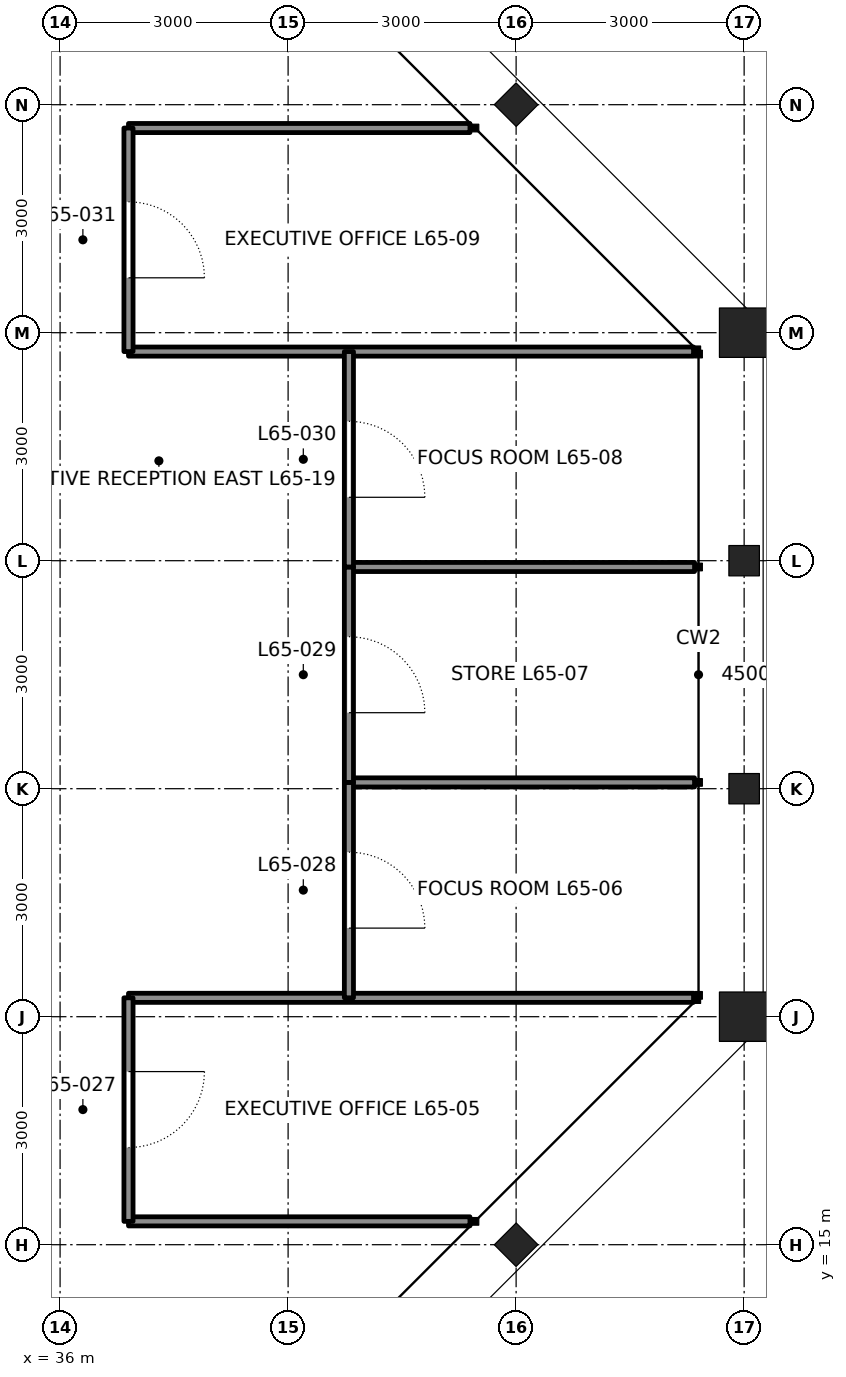
"""IFC4 building model, lengths in metres.
Left out: names, types, materials, properties, quantities, classifications, styles, units other than length and angle.
Written with IfcOpenShell. Run it as: python <this file> out.ifc"""

import sys

from ifc_helpers import new_model, si_unit, direction, frame, frame_2d, origin, origin_2d, place, context, subcontext, project, spatial, rectangle, hollow_rectangle, i_section, extrude, element, fill, save


model = new_model("IFC4")
c1 = context("Model", 3, precision=1e-05, world=origin(), true_north=direction((0.0, 1.0)))
c2 = subcontext(c1, "Body", "Model", "MODEL_VIEW")
j1 = project(units=[si_unit("LENGTHUNIT", "METRE"), si_unit("PLANEANGLEUNIT", "RADIAN")], contexts=[c1])
p1 = place(None, origin())
s1 = spatial("IfcSite", under=j1, at=p1, CompositionType="ELEMENT")
p2 = place(p1, origin())
s2 = spatial("IfcBuilding", under=s1, at=p2, CompositionType="ELEMENT")
p3 = place(p2, frame((0.0, 0.0, 291.6)))
s3 = spatial("IfcBuildingStorey", under=s2, at=p3, CompositionType="ELEMENT", Elevation=291.6)
p4 = place(p3, frame((42.0, 15.0, 0.0), z_axis=(0.0, 0.0, 1.0), x_axis=(0.707106781187, -0.707106781187, 0.0)))
e1 = element("IfcColumn", 1, at=p4, inside=s3, PredefinedType="COLUMN", context=c2, shape_type="SweptSolid", body=[
    extrude(i_section(OverallWidth=0.404, OverallDepth=0.406, WebThickness=0.027, FlangeThickness=0.044, at=origin_2d()), origin(), (0.0, 0.0, 1.0), 4.2),
])
p5 = place(p3, frame((45.0, 18.0, 0.0), z_axis=(0.0, 0.0, 1.0), x_axis=(1.0, 0.0, 0.0)))
e2 = element("IfcColumn", 2, at=p5, inside=s3, PredefinedType="COLUMN", context=c2, shape_type="SweptSolid", body=[
    extrude(hollow_rectangle(XDim=0.65, YDim=0.65, WallThickness=0.065, at=origin_2d()), origin(), (0.0, 0.0, 1.0), 4.2),
])
for number, where, z_axis, x_axis in (
    (3, (45.0, 21.0, 0.0), (0.0, 0.0, 1.0), (1.0, 0.0, 0.0)),
    (4, (45.0, 24.0, 0.0), (0.0, 0.0, 1.0), (1.0, 0.0, 0.0)),
):
    element("IfcColumn", number, at=place(p3, frame(where, z_axis=z_axis, x_axis=x_axis)), inside=s3, PredefinedType="COLUMN", context=c2, shape_type="SweptSolid", body=[
        extrude(i_section(OverallWidth=0.401, OverallDepth=0.399, WebThickness=0.025, FlangeThickness=0.04, at=origin_2d()), origin(), (0.0, 0.0, 1.0), 4.2),
    ])
p6 = place(p3, frame((45.0, 27.0, 0.0), z_axis=(0.0, 0.0, 1.0), x_axis=(1.0, 0.0, 0.0)))
e5 = element("IfcColumn", 5, at=p6, inside=s3, PredefinedType="COLUMN", context=c2, shape_type="SweptSolid", body=[
    extrude(hollow_rectangle(XDim=0.65, YDim=0.65, WallThickness=0.065, at=origin_2d()), origin(), (0.0, 0.0, 1.0), 4.2),
])
p7 = place(p3, frame((42.0, 30.0, 0.0), z_axis=(0.0, 0.0, 1.0), x_axis=(0.707106781187, 0.707106781187, 0.0)))
e6 = element("IfcColumn", 6, at=p7, inside=s3, PredefinedType="COLUMN", context=c2, shape_type="SweptSolid", body=[
    extrude(i_section(OverallWidth=0.404, OverallDepth=0.406, WebThickness=0.027, FlangeThickness=0.044, at=origin_2d()), origin(), (0.0, 0.0, 1.0), 4.2),
])
p8 = place(p3, frame((41.393, 15.307, 0.0), z_axis=(0.0, 0.0, 1.0), x_axis=(-1.0, 0.0, 0.0)))
e7 = element("IfcWall", 7, at=p8, inside=s3, PredefinedType="PARTITIONING", context=c2, shape_type="SweptSolid", body=[
    extrude(rectangle(XDim=4.493, YDim=0.12, at=frame_2d((2.246, 0.0))), origin(), (0.0, 0.0, 1.0), 4.04),
])
p9 = place(p3, frame((44.334, 18.249, 0.0), z_axis=(0.0, 0.0, 1.0), x_axis=(-1.0, 0.0, 0.0)))
e8 = element("IfcWall", 8, at=p9, inside=s3, PredefinedType="PARTITIONING", context=c2, shape_type="SweptSolid", body=[
    extrude(rectangle(XDim=7.434, YDim=0.12, at=frame_2d((3.717, 0.0))), origin(), (0.0, 0.0, 1.0), 4.04),
])
for number, where, z_axis, x_axis in (
    (9, (44.347, 21.083, 0.0), (0.0, 0.0, 1.0), (-1.0, 0.0, 0.0)),
    (10, (44.347, 23.917, 0.0), (0.0, 0.0, 1.0), (-1.0, 0.0, 0.0)),
):
    element("IfcWall", number, at=place(p3, frame(where, z_axis=z_axis, x_axis=x_axis)), inside=s3, PredefinedType="PARTITIONING", context=c2, shape_type="SweptSolid", body=[
        extrude(rectangle(XDim=4.547, YDim=0.12, at=frame_2d((2.274, 0.0))), origin(), (0.0, 0.0, 1.0), 3.357),
    ])
p10 = place(p3, frame((44.334, 26.751, 0.0), z_axis=(0.0, 0.0, 1.0), x_axis=(-1.0, 0.0, 0.0)))
e11 = element("IfcWall", 11, at=p10, inside=s3, PredefinedType="PARTITIONING", context=c2, shape_type="SweptSolid", body=[
    extrude(rectangle(XDim=7.434, YDim=0.12, at=frame_2d((3.717, 0.0))), origin(), (0.0, 0.0, 1.0), 4.04),
])
p11 = place(p3, frame((41.393, 29.693, 0.0), z_axis=(0.0, 0.0, 1.0), x_axis=(-1.0, 0.0, 0.0)))
e12 = element("IfcWall", 12, at=p11, inside=s3, PredefinedType="PARTITIONING", context=c2, shape_type="SweptSolid", body=[
    extrude(rectangle(XDim=4.493, YDim=0.12, at=frame_2d((2.246, 0.0))), origin(), (0.0, 0.0, 1.0), 4.04),
])
p12 = place(p3, frame((36.9, 15.307, 0.0), z_axis=(0.0, 0.0, 1.0), x_axis=(0.0, 1.0, 0.0)))
e13 = element("IfcWall", 13, at=p12, inside=s3, PredefinedType="PARTITIONING", context=c2, shape_type="SweptSolid", body=[
    extrude(rectangle(XDim=2.941, YDim=0.12, at=frame_2d((1.471, 0.0))), origin(), (0.0, 0.0, 1.0), 4.04),
])
p13 = place(p12, frame((0.971, 0.0, 0.0)))
e14 = element("IfcOpeningElement", 14, at=p13, cuts=e13, PredefinedType="OPENING", context=c2, shape_type="SweptSolid", body=[
    extrude(rectangle(XDim=1.0, YDim=2.4, at=frame_2d((0.5, 1.2))), frame((0.0, 0.07, 0.0), z_axis=(0.0, -1.0, 0.0), x_axis=(1.0, 0.0, 0.0)), (0.0, 0.0, 1.0), 0.14),
])
p14 = place(p3, frame((39.8, 18.249, 0.0), z_axis=(0.0, 0.0, 1.0), x_axis=(0.0, 1.0, 0.0)))
e15 = element("IfcWall", 15, at=p14, inside=s3, PredefinedType="PARTITIONING", context=c2, shape_type="SweptSolid", body=[
    extrude(rectangle(XDim=2.834, YDim=0.12, at=frame_2d((1.417, 0.0))), origin(), (0.0, 0.0, 1.0), 4.04),
])
p15 = place(p14, frame((0.917, 0.0, 0.0)))
e16 = element("IfcOpeningElement", 16, at=p15, cuts=e15, PredefinedType="OPENING", context=c2, shape_type="SweptSolid", body=[
    extrude(rectangle(XDim=1.0, YDim=2.4, at=frame_2d((0.5, 1.2))), frame((0.0, 0.07, 0.0), z_axis=(0.0, -1.0, 0.0), x_axis=(1.0, 0.0, 0.0)), (0.0, 0.0, 1.0), 0.14),
])
p16 = place(p3, frame((39.8, 21.083, 0.0), z_axis=(0.0, 0.0, 1.0), x_axis=(0.0, 1.0, 0.0)))
e17 = element("IfcWall", 17, at=p16, inside=s3, PredefinedType="PARTITIONING", context=c2, shape_type="SweptSolid", body=[
    extrude(rectangle(XDim=2.834, YDim=0.12, at=frame_2d((1.417, 0.0))), origin(), (0.0, 0.0, 1.0), 4.04),
])
p17 = place(p16, frame((0.917, 0.0, 0.0)))
e18 = element("IfcOpeningElement", 18, at=p17, cuts=e17, PredefinedType="OPENING", context=c2, shape_type="SweptSolid", body=[
    extrude(rectangle(XDim=1.0, YDim=2.4, at=frame_2d((0.5, 1.2))), frame((0.0, 0.07, 0.0), z_axis=(0.0, -1.0, 0.0), x_axis=(1.0, 0.0, 0.0)), (0.0, 0.0, 1.0), 0.14),
])
p18 = place(p3, frame((39.8, 23.917, 0.0), z_axis=(0.0, 0.0, 1.0), x_axis=(0.0, 1.0, 0.0)))
e19 = element("IfcWall", 19, at=p18, inside=s3, PredefinedType="PARTITIONING", context=c2, shape_type="SweptSolid", body=[
    extrude(rectangle(XDim=2.834, YDim=0.12, at=frame_2d((1.417, 0.0))), origin(), (0.0, 0.0, 1.0), 4.04),
])
p19 = place(p18, frame((0.917, 0.0, 0.0)))
e20 = element("IfcOpeningElement", 20, at=p19, cuts=e19, PredefinedType="OPENING", context=c2, shape_type="SweptSolid", body=[
    extrude(rectangle(XDim=1.0, YDim=2.4, at=frame_2d((0.5, 1.2))), frame((0.0, 0.07, 0.0), z_axis=(0.0, -1.0, 0.0), x_axis=(1.0, 0.0, 0.0)), (0.0, 0.0, 1.0), 0.14),
])
p20 = place(p3, frame((36.9, 26.751, 0.0), z_axis=(0.0, 0.0, 1.0), x_axis=(0.0, 1.0, 0.0)))
e21 = element("IfcWall", 21, at=p20, inside=s3, PredefinedType="PARTITIONING", context=c2, shape_type="SweptSolid", body=[
    extrude(rectangle(XDim=2.941, YDim=0.12, at=frame_2d((1.471, 0.0))), origin(), (0.0, 0.0, 1.0), 4.04),
])
p21 = place(p20, frame((0.971, 0.0, 0.0)))
e22 = element("IfcOpeningElement", 22, at=p21, cuts=e21, PredefinedType="OPENING", context=c2, shape_type="SweptSolid", body=[
    extrude(rectangle(XDim=1.0, YDim=2.4, at=frame_2d((0.5, 1.2))), frame((0.0, 0.07, 0.0), z_axis=(0.0, -1.0, 0.0), x_axis=(1.0, 0.0, 0.0)), (0.0, 0.0, 1.0), 0.14),
])
p22 = place(p13, frame((1.0, 0.0, 0.0), z_axis=(0.0, 0.0, 1.0), x_axis=(-1.0, 0.0, 0.0)))
e23 = element("IfcDoor", 23, at=p22, inside=s3, OperationType="SINGLE_SWING_LEFT", PredefinedType="DOOR", context=c2, shape_type="SweptSolid", body=[
    extrude(rectangle(XDim=1.0, YDim=2.4, at=frame_2d((0.5, 1.2))), frame((0.0, 0.025, 0.0), z_axis=(0.0, -1.0, 0.0), x_axis=(1.0, 0.0, 0.0)), (0.0, 0.0, 1.0), 0.05),
])
fill(e14, e23)
p23 = place(p15, frame((1.0, 0.0, 0.0), z_axis=(0.0, 0.0, 1.0), x_axis=(-1.0, 0.0, 0.0)))
e24 = element("IfcDoor", 24, at=p23, inside=s3, OperationType="SINGLE_SWING_RIGHT", PredefinedType="DOOR", context=c2, shape_type="SweptSolid", body=[
    extrude(rectangle(XDim=1.0, YDim=2.4, at=frame_2d((0.5, 1.2))), frame((0.0, 0.025, 0.0), z_axis=(0.0, -1.0, 0.0), x_axis=(1.0, 0.0, 0.0)), (0.0, 0.0, 1.0), 0.05),
])
fill(e16, e24)
p24 = place(p17, frame((1.0, 0.0, 0.0), z_axis=(0.0, 0.0, 1.0), x_axis=(-1.0, 0.0, 0.0)))
e25 = element("IfcDoor", 25, at=p24, inside=s3, OperationType="SINGLE_SWING_RIGHT", PredefinedType="DOOR", context=c2, shape_type="SweptSolid", body=[
    extrude(rectangle(XDim=1.0, YDim=2.4, at=frame_2d((0.5, 1.2))), frame((0.0, 0.025, 0.0), z_axis=(0.0, -1.0, 0.0), x_axis=(1.0, 0.0, 0.0)), (0.0, 0.0, 1.0), 0.05),
])
fill(e18, e25)
p25 = place(p19, frame((1.0, 0.0, 0.0), z_axis=(0.0, 0.0, 1.0), x_axis=(-1.0, 0.0, 0.0)))
e26 = element("IfcDoor", 26, at=p25, inside=s3, OperationType="SINGLE_SWING_RIGHT", PredefinedType="DOOR", context=c2, shape_type="SweptSolid", body=[
    extrude(rectangle(XDim=1.0, YDim=2.4, at=frame_2d((0.5, 1.2))), frame((0.0, 0.025, 0.0), z_axis=(0.0, -1.0, 0.0), x_axis=(1.0, 0.0, 0.0)), (0.0, 0.0, 1.0), 0.05),
])
fill(e20, e26)
p26 = place(p21, frame((1.0, 0.0, 0.0), z_axis=(0.0, 0.0, 1.0), x_axis=(-1.0, 0.0, 0.0)))
e27 = element("IfcDoor", 27, at=p26, inside=s3, OperationType="SINGLE_SWING_RIGHT", PredefinedType="DOOR", context=c2, shape_type="SweptSolid", body=[
    extrude(rectangle(XDim=1.0, YDim=2.4, at=frame_2d((0.5, 1.2))), frame((0.0, 0.025, 0.0), z_axis=(0.0, -1.0, 0.0), x_axis=(1.0, 0.0, 0.0)), (0.0, 0.0, 1.0), 0.05),
])
fill(e22, e27)
save(model, sys.argv[1])
